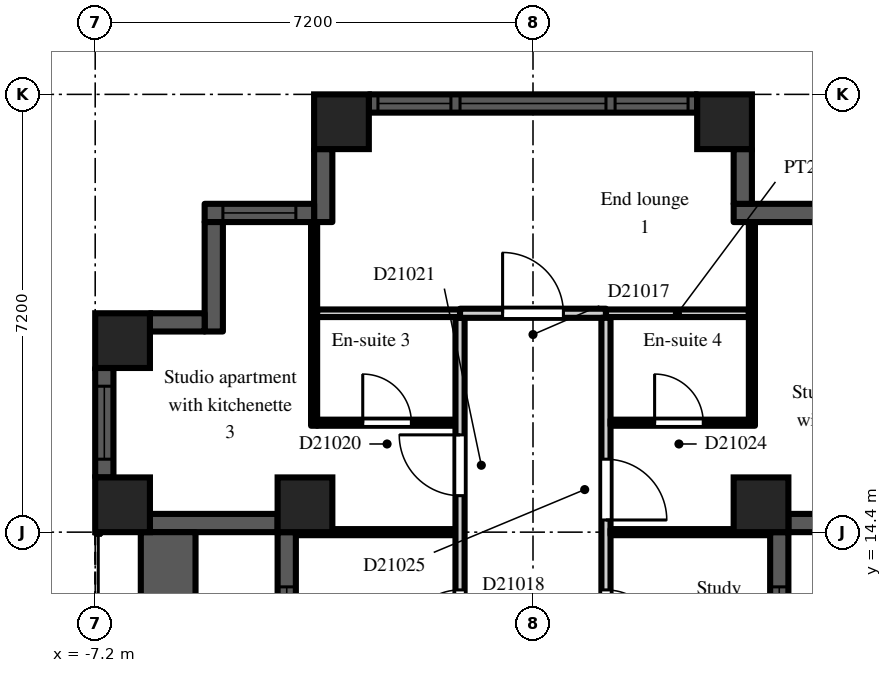
"""IFC4 building model, lengths in metres.
Left out: names, types, materials, properties, quantities, classifications, styles, units other than length and angle.
Written with IfcOpenShell. Run it as: python <this file> out.ifc"""

import sys

from ifc_helpers import new_model, si_unit, direction, frame, frame_2d, origin, origin_2d, place, context, subcontext, project, spatial, rectangle, extrude, element, fill, save


model = new_model("IFC4")
c1 = context("Model", 3, precision=1e-05, world=origin(), true_north=direction((0.0, 1.0)))
c2 = subcontext(c1, "Body", "Model", "MODEL_VIEW")
j1 = project(units=[si_unit("LENGTHUNIT", "METRE"), si_unit("PLANEANGLEUNIT", "RADIAN")], contexts=[c1])
p1 = place(None, origin())
s1 = spatial("IfcSite", under=j1, at=p1, CompositionType="ELEMENT")
p2 = place(p1, origin())
s2 = spatial("IfcBuilding", under=s1, at=p2, CompositionType="ELEMENT")
p3 = place(p2, frame((0.0, 0.0, 147.3)))
s3 = spatial("IfcBuildingStorey", under=s2, at=p3, CompositionType="ELEMENT", Elevation=147.3)
for number, where, z_axis, x_axis in (
    (1, (-6.75, 14.85, 0.0), (0.0, 0.0, 1.0), (1.0, 0.0, 0.0)),
    (2, (-6.75, 17.55, 0.0), (0.0, 0.0, 1.0), (1.0, 0.0, 0.0)),
    (3, (-3.75, 14.85, 0.0), (0.0, 0.0, 1.0), (1.0, 0.0, 0.0)),
    (4, (-3.15, 21.15, 0.0), (0.0, 0.0, 1.0), (1.0, 0.0, 0.0)),
    (5, (3.15, 21.15, 0.0), (0.0, 0.0, 1.0), (1.0, 0.0, 0.0)),
    (6, (3.75, 14.85, 0.0), (0.0, 0.0, 1.0), (1.0, 0.0, 0.0)),
):
    element("IfcColumn", number, at=place(p3, frame(where, z_axis=z_axis, x_axis=x_axis)), inside=s3, PredefinedType="COLUMN", context=c2, shape_type="SweptSolid", body=[
        extrude(rectangle(XDim=0.9, YDim=0.9, at=origin_2d()), origin(), (0.0, 0.0, 1.0), 3.0),
    ])
p4 = place(p3, frame((4.05, 7.2, 0.0), z_axis=(0.0, 0.0, 1.0), x_axis=(0.0, 1.0, 0.0)))
e7 = element("IfcWall", 7, at=p4, inside=s3, PredefinedType="SOLIDWALL", context=c2, shape_type="SweptSolid", body=[
    extrude(rectangle(XDim=7.2, YDim=0.3, at=frame_2d((3.6, 0.0))), origin(), (0.0, 0.0, 1.0), 2.2),
])
p5 = place(p4, frame((3.0, 0.0, 0.0)))
e8 = element("IfcOpeningElement", 8, at=p5, cuts=e7, PredefinedType="OPENING", context=c2, shape_type="SweptSolid", body=[
    extrude(rectangle(XDim=1.2, YDim=2.05, at=frame_2d((0.6, 1.025))), frame((0.0, 0.16, 0.0), z_axis=(0.0, -1.0, 0.0), x_axis=(1.0, 0.0, 0.0)), (0.0, 0.0, 1.0), 0.32),
])
p6 = place(p4, frame((0.9, 0.0, 0.2)))
e9 = element("IfcOpeningElement", 9, at=p6, cuts=e7, PredefinedType="OPENING", context=c2, shape_type="SweptSolid", body=[
    extrude(rectangle(XDim=1.8, YDim=1.85, at=frame_2d((0.9, 0.925))), frame((0.0, 0.16, 0.0), z_axis=(0.0, -1.0, 0.0), x_axis=(1.0, 0.0, 0.0)), (0.0, 0.0, 1.0), 0.32),
])
p7 = place(p4, frame((4.5, 0.0, 0.2)))
e10 = element("IfcOpeningElement", 10, at=p7, cuts=e7, PredefinedType="OPENING", context=c2, shape_type="SweptSolid", body=[
    extrude(rectangle(XDim=1.8, YDim=1.85, at=frame_2d((0.9, 0.925))), frame((0.0, 0.16, 0.0), z_axis=(0.0, -1.0, 0.0), x_axis=(1.0, 0.0, 0.0)), (0.0, 0.0, 1.0), 0.32),
])
p8 = place(p3, frame((4.2, 14.55, 0.0), z_axis=(0.0, 0.0, 1.0), x_axis=(1.0, 0.0, 0.0)))
e11 = element("IfcWall", 11, at=p8, inside=s3, PredefinedType="SOLIDWALL", context=c2, shape_type="SweptSolid", body=[
    extrude(rectangle(XDim=2.1, YDim=0.3, at=frame_2d((1.05, 0.0))), origin(), (0.0, 0.0, 1.0), 2.2),
])
p9 = place(p3, frame((5.1, 19.65, 0.0), z_axis=(0.0, 0.0, 1.0), x_axis=(-1.0, 0.0, 0.0)))
e12 = element("IfcWall", 12, at=p9, inside=s3, PredefinedType="SOLIDWALL", context=c2, shape_type="SweptSolid", body=[
    extrude(rectangle(XDim=1.8, YDim=0.3, at=frame_2d((0.9, 0.0))), origin(), (0.0, 0.0, 1.0), 2.6),
])
p10 = place(p3, frame((3.45, 19.8, 0.0), z_axis=(0.0, 0.0, 1.0), x_axis=(0.0, 1.0, 0.0)))
e13 = element("IfcWall", 13, at=p10, inside=s3, PredefinedType="SOLIDWALL", context=c2, shape_type="SweptSolid", body=[
    extrude(rectangle(XDim=0.9, YDim=0.3, at=frame_2d((0.45, 0.0))), origin(), (0.0, 0.0, 1.0), 2.6),
])
p11 = place(p3, frame((2.7, 21.45, 0.0), z_axis=(0.0, 0.0, 1.0), x_axis=(-1.0, 0.0, 0.0)))
e14 = element("IfcWall", 14, at=p11, inside=s3, PredefinedType="SOLIDWALL", context=c2, shape_type="SweptSolid", body=[
    extrude(rectangle(XDim=5.4, YDim=0.3, at=frame_2d((2.7, 0.0))), origin(), (0.0, 0.0, 1.0), 2.2),
])
p12 = place(p11, frame((1.5, 0.0, 0.2)))
e15 = element("IfcOpeningElement", 15, at=p12, cuts=e14, PredefinedType="OPENING", context=c2, shape_type="SweptSolid", body=[
    extrude(rectangle(XDim=2.4, YDim=1.85, at=frame_2d((1.2, 0.925))), frame((0.0, 0.16, 0.0), z_axis=(0.0, -1.0, 0.0), x_axis=(1.0, 0.0, 0.0)), (0.0, 0.0, 1.0), 0.32),
])
p13 = place(p11, frame((0.15, 0.0, 0.2)))
e16 = element("IfcOpeningElement", 16, at=p13, cuts=e14, PredefinedType="OPENING", context=c2, shape_type="SweptSolid", body=[
    extrude(rectangle(XDim=1.2, YDim=1.85, at=frame_2d((0.6, 0.925))), frame((0.0, 0.16, 0.0), z_axis=(0.0, -1.0, 0.0), x_axis=(1.0, 0.0, 0.0)), (0.0, 0.0, 1.0), 0.32),
])
p14 = place(p11, frame((4.05, 0.0, 0.2)))
e17 = element("IfcOpeningElement", 17, at=p14, cuts=e14, PredefinedType="OPENING", context=c2, shape_type="SweptSolid", body=[
    extrude(rectangle(XDim=1.2, YDim=1.85, at=frame_2d((0.6, 0.925))), frame((0.0, 0.16, 0.0), z_axis=(0.0, -1.0, 0.0), x_axis=(1.0, 0.0, 0.0)), (0.0, 0.0, 1.0), 0.32),
])
p15 = place(p3, frame((-3.45, 20.7, 0.0), z_axis=(0.0, 0.0, 1.0), x_axis=(0.0, -1.0, 0.0)))
e18 = element("IfcWall", 18, at=p15, inside=s3, PredefinedType="SOLIDWALL", context=c2, shape_type="SweptSolid", body=[
    extrude(rectangle(XDim=1.2, YDim=0.3, at=frame_2d((0.6, 0.0))), origin(), (0.0, 0.0, 1.0), 2.6),
])
p16 = place(p3, frame((-3.6, 19.65, 0.0), z_axis=(0.0, 0.0, 1.0), x_axis=(-1.0, 0.0, 0.0)))
e19 = element("IfcWall", 19, at=p16, inside=s3, PredefinedType="SOLIDWALL", context=c2, shape_type="SweptSolid", body=[
    extrude(rectangle(XDim=1.8, YDim=0.3, at=frame_2d((0.9, 0.0))), origin(), (0.0, 0.0, 1.0), 2.6),
])
p17 = place(p16, frame((0.3, 0.0, 0.2)))
e20 = element("IfcOpeningElement", 20, at=p17, cuts=e19, PredefinedType="OPENING", context=c2, shape_type="SweptSolid", body=[
    extrude(rectangle(XDim=1.2, YDim=1.85, at=frame_2d((0.6, 0.925))), frame((0.0, 0.16, 0.0), z_axis=(0.0, -1.0, 0.0), x_axis=(1.0, 0.0, 0.0)), (0.0, 0.0, 1.0), 0.32),
])
p18 = place(p3, frame((-5.25, 19.5, 0.0), z_axis=(0.0, 0.0, 1.0), x_axis=(0.0, -1.0, 0.0)))
e21 = element("IfcWall", 21, at=p18, inside=s3, PredefinedType="SOLIDWALL", context=c2, shape_type="SweptSolid", body=[
    extrude(rectangle(XDim=1.8, YDim=0.3, at=frame_2d((0.9, 0.0))), origin(), (0.0, 0.0, 1.0), 2.6),
])
p19 = place(p3, frame((-5.4, 17.85, 0.0), z_axis=(0.0, 0.0, 1.0), x_axis=(-1.0, 0.0, 0.0)))
e22 = element("IfcWall", 22, at=p19, inside=s3, PredefinedType="SOLIDWALL", context=c2, shape_type="SweptSolid", body=[
    extrude(rectangle(XDim=0.9, YDim=0.3, at=frame_2d((0.45, 0.0))), origin(), (0.0, 0.0, 1.0), 2.6),
])
p20 = place(p3, frame((-7.05, 17.1, 0.0), z_axis=(0.0, 0.0, 1.0), x_axis=(0.0, -1.0, 0.0)))
e23 = element("IfcWall", 23, at=p20, inside=s3, PredefinedType="SOLIDWALL", context=c2, shape_type="SweptSolid", body=[
    extrude(rectangle(XDim=1.8, YDim=0.3, at=frame_2d((0.9, 0.0))), origin(), (0.0, 0.0, 1.0), 2.2),
])
p21 = place(p20, frame((0.3, 0.0, 0.2)))
e24 = element("IfcOpeningElement", 24, at=p21, cuts=e23, PredefinedType="OPENING", context=c2, shape_type="SweptSolid", body=[
    extrude(rectangle(XDim=1.2, YDim=1.85, at=frame_2d((0.6, 0.925))), frame((0.0, 0.16, 0.0), z_axis=(0.0, -1.0, 0.0), x_axis=(1.0, 0.0, 0.0)), (0.0, 0.0, 1.0), 0.32),
])
p22 = place(p3, frame((-6.3, 14.55, 0.0), z_axis=(0.0, 0.0, 1.0), x_axis=(1.0, 0.0, 0.0)))
e25 = element("IfcWall", 25, at=p22, inside=s3, PredefinedType="SOLIDWALL", context=c2, shape_type="SweptSolid", body=[
    extrude(rectangle(XDim=2.1, YDim=0.3, at=frame_2d((1.05, 0.0))), origin(), (0.0, 0.0, 1.0), 2.2),
])
p23 = place(p3, frame((-4.05, 14.4, 0.0), z_axis=(0.0, 0.0, 1.0), x_axis=(0.0, -1.0, 0.0)))
e26 = element("IfcWall", 26, at=p23, inside=s3, PredefinedType="SOLIDWALL", context=c2, shape_type="SweptSolid", body=[
    extrude(rectangle(XDim=7.2, YDim=0.3, at=frame_2d((3.6, 0.0))), origin(), (0.0, 0.0, 1.0), 2.2),
])
p24 = place(p23, frame((3.0, 0.0, 0.0)))
e27 = element("IfcOpeningElement", 27, at=p24, cuts=e26, PredefinedType="OPENING", context=c2, shape_type="SweptSolid", body=[
    extrude(rectangle(XDim=1.2, YDim=2.05, at=frame_2d((0.6, 1.025))), frame((0.0, 0.16, 0.0), z_axis=(0.0, -1.0, 0.0), x_axis=(1.0, 0.0, 0.0)), (0.0, 0.0, 1.0), 0.32),
])
p25 = place(p23, frame((0.9, 0.0, 0.2)))
e28 = element("IfcOpeningElement", 28, at=p25, cuts=e26, PredefinedType="OPENING", context=c2, shape_type="SweptSolid", body=[
    extrude(rectangle(XDim=1.8, YDim=1.85, at=frame_2d((0.9, 0.925))), frame((0.0, 0.16, 0.0), z_axis=(0.0, -1.0, 0.0), x_axis=(1.0, 0.0, 0.0)), (0.0, 0.0, 1.0), 0.32),
])
p26 = place(p23, frame((4.5, 0.0, 0.2)))
e29 = element("IfcOpeningElement", 29, at=p26, cuts=e26, PredefinedType="OPENING", context=c2, shape_type="SweptSolid", body=[
    extrude(rectangle(XDim=1.8, YDim=1.85, at=frame_2d((0.9, 0.925))), frame((0.0, 0.16, 0.0), z_axis=(0.0, -1.0, 0.0), x_axis=(1.0, 0.0, 0.0)), (0.0, 0.0, 1.0), 0.32),
])
p27 = place(p3, frame((-6.0, 7.2, 0.0), z_axis=(0.0, 0.0, 1.0), x_axis=(0.0, 1.0, 0.0)))
e30 = element("IfcWall", 30, at=p27, inside=s3, PredefinedType="PARAPET", context=c2, shape_type="SweptSolid", body=[
    extrude(rectangle(XDim=7.2, YDim=0.9, at=frame_2d((3.6, 0.0))), origin(), (0.0, 0.0, 1.0), 0.8),
])
p28 = place(p3, frame((-3.9, 14.4, 0.0), z_axis=(0.0, 0.0, 1.0), x_axis=(1.0, 0.0, 0.0)))
e31 = element("IfcWall", 31, at=p28, inside=s3, PredefinedType="PARTITIONING", context=c2, shape_type="SweptSolid", body=[
    extrude(rectangle(XDim=2.625, YDim=0.1, at=frame_2d((1.312, 0.0))), origin(), (0.0, 0.0, 1.0), 2.6),
])
p29 = place(p3, frame((-3.6, 16.15, 0.0), z_axis=(0.0, 0.0, 1.0), x_axis=(0.0, 1.0, 0.0)))
e32 = element("IfcWall", 32, at=p29, inside=s3, PredefinedType="PARTITIONING", context=c2, shape_type="SweptSolid", body=[
    extrude(rectangle(XDim=3.35, YDim=0.1, at=frame_2d((1.675, 0.0))), origin(), (0.0, 0.0, 1.0), 2.6),
])
p30 = place(p3, frame((-3.55, 16.2, 0.0), z_axis=(0.0, 0.0, 1.0), x_axis=(1.0, 0.0, 0.0)))
e33 = element("IfcWall", 33, at=p30, inside=s3, PredefinedType="PARTITIONING", context=c2, shape_type="SweptSolid", body=[
    extrude(rectangle(XDim=2.275, YDim=0.1, at=frame_2d((1.138, 0.0))), origin(), (0.0, 0.0, 1.0), 2.6),
])
p31 = place(p30, frame((0.75, 0.0, 0.0)))
e34 = element("IfcOpeningElement", 34, at=p31, cuts=e33, PredefinedType="OPENING", context=c2, shape_type="SweptSolid", body=[
    extrude(rectangle(XDim=0.8, YDim=2.1, at=frame_2d((0.4, 1.05))), frame((0.0, 0.06, 0.0), z_axis=(0.0, -1.0, 0.0), x_axis=(1.0, 0.0, 0.0)), (0.0, 0.0, 1.0), 0.12),
])
p32 = place(p3, frame((-3.55, 18.0, 0.0), z_axis=(0.0, 0.0, 1.0), x_axis=(1.0, 0.0, 0.0)))
e35 = element("IfcWall", 35, at=p32, inside=s3, PredefinedType="PARTITIONING", context=c2, shape_type="SweptSolid", body=[
    extrude(rectangle(XDim=2.35, YDim=0.125, at=frame_2d((1.175, 0.0))), origin(), (0.0, 0.0, 1.0), 2.6),
])
p33 = place(p3, frame((-1.2, 7.275, 0.0), z_axis=(0.0, 0.0, 1.0), x_axis=(0.0, 1.0, 0.0)))
e36 = element("IfcWall", 36, at=p33, inside=s3, PredefinedType="PARTITIONING", context=c2, shape_type="SweptSolid", body=[
    extrude(rectangle(XDim=10.65, YDim=0.15, at=frame_2d((5.325, 0.0))), origin(), (0.0, 0.0, 1.0), 2.6),
])
p34 = place(p33, frame((5.275, 0.0, 0.0)))
e37 = element("IfcOpeningElement", 37, at=p34, cuts=e36, PredefinedType="OPENING", context=c2, shape_type="SweptSolid", body=[
    extrude(rectangle(XDim=0.9, YDim=2.1, at=frame_2d((0.45, 1.05))), frame((0.0, 0.085, 0.0), z_axis=(0.0, -1.0, 0.0), x_axis=(1.0, 0.0, 0.0)), (0.0, 0.0, 1.0), 0.17),
])
p35 = place(p33, frame((1.675, 0.0, 0.0)))
e38 = element("IfcOpeningElement", 38, at=p35, cuts=e36, PredefinedType="OPENING", context=c2, shape_type="SweptSolid", body=[
    extrude(rectangle(XDim=0.9, YDim=2.1, at=frame_2d((0.45, 1.05))), frame((0.0, 0.085, 0.0), z_axis=(0.0, -1.0, 0.0), x_axis=(1.0, 0.0, 0.0)), (0.0, 0.0, 1.0), 0.17),
])
p36 = place(p33, frame((7.725, 0.0, 0.0)))
e39 = element("IfcOpeningElement", 39, at=p36, cuts=e36, PredefinedType="OPENING", context=c2, shape_type="SweptSolid", body=[
    extrude(rectangle(XDim=1.0, YDim=2.1, at=frame_2d((0.5, 1.05))), frame((0.0, 0.085, 0.0), z_axis=(0.0, -1.0, 0.0), x_axis=(1.0, 0.0, 0.0)), (0.0, 0.0, 1.0), 0.17),
])
p37 = place(p3, frame((-1.2, 18.0, 0.0), z_axis=(0.0, 0.0, 1.0), x_axis=(1.0, 0.0, 0.0)))
e40 = element("IfcWall", 40, at=p37, inside=s3, PredefinedType="PARTITIONING", context=c2, shape_type="SweptSolid", body=[
    extrude(rectangle(XDim=2.4, YDim=0.15, at=frame_2d((1.2, 0.0))), origin(), (0.0, 0.0, 1.0), 2.6),
])
p38 = place(p37, frame((0.7, 0.0, 0.0)))
e41 = element("IfcOpeningElement", 41, at=p38, cuts=e40, PredefinedType="OPENING", context=c2, shape_type="SweptSolid", body=[
    extrude(rectangle(XDim=1.0, YDim=2.1, at=frame_2d((0.5, 1.05))), frame((0.0, 0.085, 0.0), z_axis=(0.0, -1.0, 0.0), x_axis=(1.0, 0.0, 0.0)), (0.0, 0.0, 1.0), 0.17),
])
p39 = place(p3, frame((1.2, 7.125, 0.0), z_axis=(0.0, 0.0, 1.0), x_axis=(0.0, 1.0, 0.0)))
e42 = element("IfcWall", 42, at=p39, inside=s3, PredefinedType="PARTITIONING", context=c2, shape_type="SweptSolid", body=[
    extrude(rectangle(XDim=10.8, YDim=0.15, at=frame_2d((5.4, 0.0))), origin(), (0.0, 0.0, 1.0), 2.6),
])
p40 = place(p39, frame((5.425, 0.0, 0.0)))
e43 = element("IfcOpeningElement", 43, at=p40, cuts=e42, PredefinedType="OPENING", context=c2, shape_type="SweptSolid", body=[
    extrude(rectangle(XDim=0.9, YDim=2.1, at=frame_2d((0.45, 1.05))), frame((0.0, 0.085, 0.0), z_axis=(0.0, -1.0, 0.0), x_axis=(1.0, 0.0, 0.0)), (0.0, 0.0, 1.0), 0.17),
])
p41 = place(p39, frame((1.825, 0.0, 0.0)))
e44 = element("IfcOpeningElement", 44, at=p41, cuts=e42, PredefinedType="OPENING", context=c2, shape_type="SweptSolid", body=[
    extrude(rectangle(XDim=0.9, YDim=2.1, at=frame_2d((0.45, 1.05))), frame((0.0, 0.085, 0.0), z_axis=(0.0, -1.0, 0.0), x_axis=(1.0, 0.0, 0.0)), (0.0, 0.0, 1.0), 0.17),
])
p42 = place(p39, frame((7.475, 0.0, 0.0)))
e45 = element("IfcOpeningElement", 45, at=p42, cuts=e42, PredefinedType="OPENING", context=c2, shape_type="SweptSolid", body=[
    extrude(rectangle(XDim=1.0, YDim=2.1, at=frame_2d((0.5, 1.05))), frame((0.0, 0.085, 0.0), z_axis=(0.0, -1.0, 0.0), x_axis=(1.0, 0.0, 0.0)), (0.0, 0.0, 1.0), 0.17),
])
p43 = place(p3, frame((1.275, 14.4, 0.0), z_axis=(0.0, 0.0, 1.0), x_axis=(1.0, 0.0, 0.0)))
e46 = element("IfcWall", 46, at=p43, inside=s3, PredefinedType="PARTITIONING", context=c2, shape_type="SweptSolid", body=[
    extrude(rectangle(XDim=2.625, YDim=0.1, at=frame_2d((1.312, 0.0))), origin(), (0.0, 0.0, 1.0), 2.6),
])
p44 = place(p3, frame((1.275, 16.2, 0.0), z_axis=(0.0, 0.0, 1.0), x_axis=(1.0, 0.0, 0.0)))
e47 = element("IfcWall", 47, at=p44, inside=s3, PredefinedType="PARTITIONING", context=c2, shape_type="SweptSolid", body=[
    extrude(rectangle(XDim=2.375, YDim=0.1, at=frame_2d((1.188, 0.0))), origin(), (0.0, 0.0, 1.0), 2.6),
])
p45 = place(p44, frame((0.725, 0.0, 0.0)))
e48 = element("IfcOpeningElement", 48, at=p45, cuts=e47, PredefinedType="OPENING", context=c2, shape_type="SweptSolid", body=[
    extrude(rectangle(XDim=0.8, YDim=2.1, at=frame_2d((0.4, 1.05))), frame((0.0, 0.06, 0.0), z_axis=(0.0, -1.0, 0.0), x_axis=(1.0, 0.0, 0.0)), (0.0, 0.0, 1.0), 0.12),
])
p46 = place(p3, frame((1.2, 18.0, 0.0), z_axis=(0.0, 0.0, 1.0), x_axis=(1.0, 0.0, 0.0)))
e49 = element("IfcWall", 49, at=p46, inside=s3, PredefinedType="PARTITIONING", context=c2, shape_type="SweptSolid", body=[
    extrude(rectangle(XDim=2.35, YDim=0.125, at=frame_2d((1.175, 0.0))), origin(), (0.0, 0.0, 1.0), 2.6),
])
p47 = place(p3, frame((3.6, 16.25, 0.0), z_axis=(0.0, 0.0, 1.0), x_axis=(0.0, 1.0, 0.0)))
e50 = element("IfcWall", 50, at=p47, inside=s3, PredefinedType="PARTITIONING", context=c2, shape_type="SweptSolid", body=[
    extrude(rectangle(XDim=3.25, YDim=0.1, at=frame_2d((1.625, 0.0))), origin(), (0.0, 0.0, 1.0), 2.6),
])
p48 = place(p7, origin())
e51 = element("IfcWindow", 51, at=p48, inside=s3, PartitioningType="SINGLE_PANEL", PredefinedType="WINDOW", context=c2, shape_type="SweptSolid", body=[
    extrude(rectangle(XDim=1.8, YDim=1.85, at=frame_2d((0.9, 0.925))), frame((0.0, 0.03, 0.0), z_axis=(0.0, -1.0, 0.0), x_axis=(1.0, 0.0, 0.0)), (0.0, 0.0, 1.0), 0.06),
])
fill(e10, e51)
p49 = place(p12, origin())
e52 = element("IfcWindow", 52, at=p49, inside=s3, PartitioningType="SINGLE_PANEL", PredefinedType="WINDOW", context=c2, shape_type="SweptSolid", body=[
    extrude(rectangle(XDim=2.4, YDim=1.85, at=frame_2d((1.2, 0.925))), frame((0.0, 0.03, 0.0), z_axis=(0.0, -1.0, 0.0), x_axis=(1.0, 0.0, 0.0)), (0.0, 0.0, 1.0), 0.06),
])
fill(e15, e52)
p50 = place(p13, origin())
e53 = element("IfcWindow", 53, at=p50, inside=s3, PartitioningType="SINGLE_PANEL", PredefinedType="WINDOW", context=c2, shape_type="SweptSolid", body=[
    extrude(rectangle(XDim=1.2, YDim=1.85, at=frame_2d((0.6, 0.925))), frame((0.0, 0.03, 0.0), z_axis=(0.0, -1.0, 0.0), x_axis=(1.0, 0.0, 0.0)), (0.0, 0.0, 1.0), 0.06),
])
fill(e16, e53)
p51 = place(p14, origin())
e54 = element("IfcWindow", 54, at=p51, inside=s3, PartitioningType="SINGLE_PANEL", PredefinedType="WINDOW", context=c2, shape_type="SweptSolid", body=[
    extrude(rectangle(XDim=1.2, YDim=1.85, at=frame_2d((0.6, 0.925))), frame((0.0, 0.03, 0.0), z_axis=(0.0, -1.0, 0.0), x_axis=(1.0, 0.0, 0.0)), (0.0, 0.0, 1.0), 0.06),
])
fill(e17, e54)
p52 = place(p17, origin())
e55 = element("IfcWindow", 55, at=p52, inside=s3, PartitioningType="SINGLE_PANEL", PredefinedType="WINDOW", context=c2, shape_type="SweptSolid", body=[
    extrude(rectangle(XDim=1.2, YDim=1.85, at=frame_2d((0.6, 0.925))), frame((0.0, 0.03, 0.0), z_axis=(0.0, -1.0, 0.0), x_axis=(1.0, 0.0, 0.0)), (0.0, 0.0, 1.0), 0.06),
])
fill(e20, e55)
p53 = place(p21, origin())
e56 = element("IfcWindow", 56, at=p53, inside=s3, PartitioningType="SINGLE_PANEL", PredefinedType="WINDOW", context=c2, shape_type="SweptSolid", body=[
    extrude(rectangle(XDim=1.2, YDim=1.85, at=frame_2d((0.6, 0.925))), frame((0.0, 0.03, 0.0), z_axis=(0.0, -1.0, 0.0), x_axis=(1.0, 0.0, 0.0)), (0.0, 0.0, 1.0), 0.06),
])
fill(e24, e56)
p54 = place(p25, origin())
e57 = element("IfcWindow", 57, at=p54, inside=s3, PartitioningType="SINGLE_PANEL", PredefinedType="WINDOW", context=c2, shape_type="SweptSolid", body=[
    extrude(rectangle(XDim=1.8, YDim=1.85, at=frame_2d((0.9, 0.925))), frame((0.0, 0.03, 0.0), z_axis=(0.0, -1.0, 0.0), x_axis=(1.0, 0.0, 0.0)), (0.0, 0.0, 1.0), 0.06),
])
fill(e28, e57)
p55 = place(p38, origin())
e58 = element("IfcDoor", 58, at=p55, inside=s3, OperationType="SINGLE_SWING_LEFT", PredefinedType="DOOR", context=c2, shape_type="SweptSolid", body=[
    extrude(rectangle(XDim=1.0, YDim=2.1, at=frame_2d((0.5, 1.05))), frame((0.0, 0.025, 0.0), z_axis=(0.0, -1.0, 0.0), x_axis=(1.0, 0.0, 0.0)), (0.0, 0.0, 1.0), 0.05),
])
fill(e41, e58)
p56 = place(p34, origin())
e59 = element("IfcDoor", 59, at=p56, inside=s3, OperationType="SINGLE_SWING_LEFT", PredefinedType="DOOR", context=c2, shape_type="SweptSolid", body=[
    extrude(rectangle(XDim=0.9, YDim=2.1, at=frame_2d((0.45, 1.05))), frame((0.0, 0.025, 0.0), z_axis=(0.0, -1.0, 0.0), x_axis=(1.0, 0.0, 0.0)), (0.0, 0.0, 1.0), 0.05),
])
fill(e37, e59)
p57 = place(p31, origin())
e60 = element("IfcDoor", 60, at=p57, inside=s3, OperationType="SINGLE_SWING_LEFT", PredefinedType="DOOR", context=c2, shape_type="SweptSolid", body=[
    extrude(rectangle(XDim=0.8, YDim=2.1, at=frame_2d((0.4, 1.05))), frame((0.0, 0.025, 0.0), z_axis=(0.0, -1.0, 0.0), x_axis=(1.0, 0.0, 0.0)), (0.0, 0.0, 1.0), 0.05),
])
fill(e34, e60)
p58 = place(p36, origin())
e61 = element("IfcDoor", 61, at=p58, inside=s3, OperationType="SINGLE_SWING_RIGHT", PredefinedType="DOOR", context=c2, shape_type="SweptSolid", body=[
    extrude(rectangle(XDim=1.0, YDim=2.1, at=frame_2d((0.5, 1.05))), frame((0.0, 0.025, 0.0), z_axis=(0.0, -1.0, 0.0), x_axis=(1.0, 0.0, 0.0)), (0.0, 0.0, 1.0), 0.05),
])
fill(e39, e61)
p59 = place(p40, frame((0.9, 0.0, 0.0), z_axis=(0.0, 0.0, 1.0), x_axis=(-1.0, 0.0, 0.0)))
e62 = element("IfcDoor", 62, at=p59, inside=s3, OperationType="SINGLE_SWING_RIGHT", PredefinedType="DOOR", context=c2, shape_type="SweptSolid", body=[
    extrude(rectangle(XDim=0.9, YDim=2.1, at=frame_2d((0.45, 1.05))), frame((0.0, 0.025, 0.0), z_axis=(0.0, -1.0, 0.0), x_axis=(1.0, 0.0, 0.0)), (0.0, 0.0, 1.0), 0.05),
])
fill(e43, e62)
p60 = place(p45, origin())
e63 = element("IfcDoor", 63, at=p60, inside=s3, OperationType="SINGLE_SWING_LEFT", PredefinedType="DOOR", context=c2, shape_type="SweptSolid", body=[
    extrude(rectangle(XDim=0.8, YDim=2.1, at=frame_2d((0.4, 1.05))), frame((0.0, 0.025, 0.0), z_axis=(0.0, -1.0, 0.0), x_axis=(1.0, 0.0, 0.0)), (0.0, 0.0, 1.0), 0.05),
])
fill(e48, e63)
p61 = place(p42, frame((1.0, 0.0, 0.0), z_axis=(0.0, 0.0, 1.0), x_axis=(-1.0, 0.0, 0.0)))
e64 = element("IfcDoor", 64, at=p61, inside=s3, OperationType="SINGLE_SWING_RIGHT", PredefinedType="DOOR", context=c2, shape_type="SweptSolid", body=[
    extrude(rectangle(XDim=1.0, YDim=2.1, at=frame_2d((0.5, 1.05))), frame((0.0, 0.025, 0.0), z_axis=(0.0, -1.0, 0.0), x_axis=(1.0, 0.0, 0.0)), (0.0, 0.0, 1.0), 0.05),
])
fill(e45, e64)
save(model, sys.argv[1])
